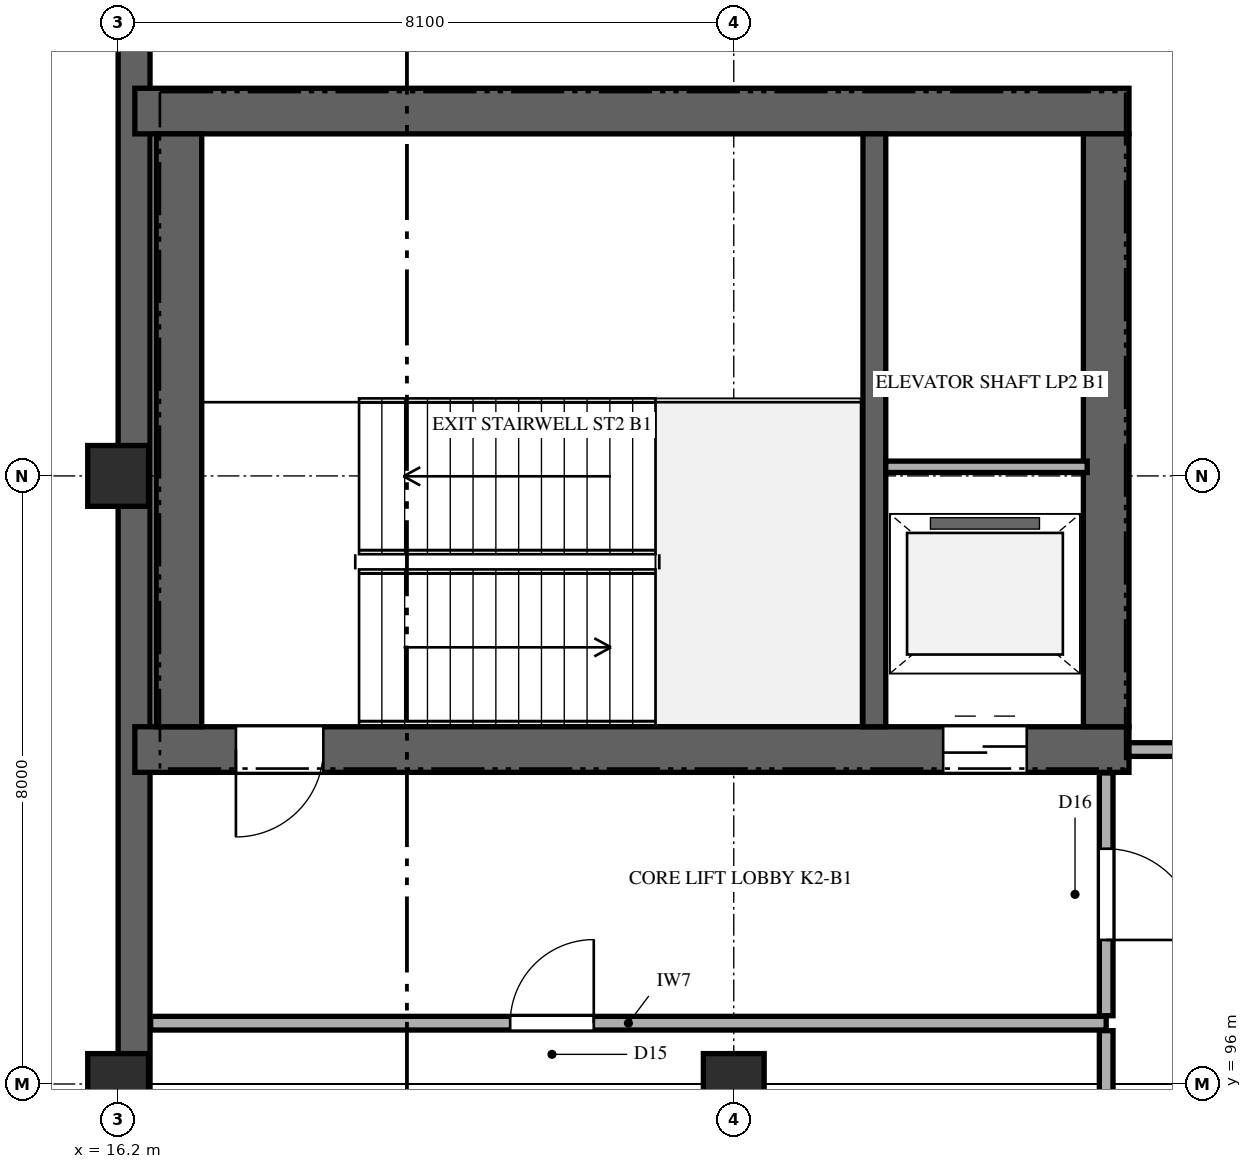
"""IFC4 building model, lengths in metres.
Left out: names, types, materials, properties, quantities, classifications, styles, units other than length and angle.
Written with IfcOpenShell. Run it as: python <this file> out.ifc"""

import sys

from ifc_helpers import new_model, si_unit, direction, frame, frame_2d, origin, origin_2d, place, context, subcontext, project, spatial, rectangle, extrude, element, fill, save


model = new_model("IFC4")
c1 = context("Model", 3, precision=1e-05, world=origin(), true_north=direction((0.0, 1.0)))
c2 = subcontext(c1, "Body", "Model", "MODEL_VIEW")
j1 = project(units=[si_unit("LENGTHUNIT", "METRE"), si_unit("PLANEANGLEUNIT", "RADIAN")], contexts=[c1])
p1 = place(None, origin())
s1 = spatial("IfcSite", under=j1, at=p1, CompositionType="ELEMENT")
p2 = place(p1, origin())
s2 = spatial("IfcBuilding", under=s1, at=p2, CompositionType="ELEMENT")
p3 = place(p2, frame((0.0, 0.0, -4.8)))
s3 = spatial("IfcBuildingStorey", under=s2, at=p3, CompositionType="ELEMENT", Elevation=-4.8)
p4 = place(p3, frame((16.41, 24.21, 0.0), z_axis=(0.0, 0.0, 1.0), x_axis=(0.0, 1.0, 0.0)))
e1 = element("IfcWall", 1, at=p4, inside=s3, PredefinedType="USERDEFINED", context=c2, shape_type="SweptSolid", body=[
    extrude(rectangle(XDim=87.58, YDim=0.42, at=frame_2d((43.79, 0.0))), origin(), (0.0, 0.0, 1.0), 4.45),
])
p5 = place(p3, frame((16.42, 100.4, 0.0), z_axis=(0.0, 0.0, 1.0), x_axis=(1.0, 0.0, 0.0)))
e2 = element("IfcWall", 2, at=p5, inside=s3, PredefinedType="SHEAR", context=c2, shape_type="SweptSolid", body=[
    extrude(rectangle(XDim=13.08, YDim=0.6, at=frame_2d((6.54, 0.0))), origin(), (0.0, 0.0, 1.0), 4.8),
])
p6 = place(p5, frame((1.33, 0.0, 0.0)))
e3 = element("IfcOpeningElement", 3, at=p6, cuts=e2, PredefinedType="OPENING", context=c2, shape_type="SweptSolid", body=[
    extrude(rectangle(XDim=1.15, YDim=2.25, at=frame_2d((0.575, 1.125))), frame((0.0, 0.31, 0.0), z_axis=(0.0, -1.0, 0.0), x_axis=(1.0, 0.0, 0.0)), (0.0, 0.0, 1.0), 0.62),
])
p7 = place(p5, frame((10.635, 0.0, 0.0)))
e4 = element("IfcOpeningElement", 4, at=p7, cuts=e2, PredefinedType="OPENING", context=c2, shape_type="SweptSolid", body=[
    extrude(rectangle(XDim=1.1, YDim=2.2, at=frame_2d((0.55, 1.1))), frame((0.0, 0.31, 0.0), z_axis=(0.0, -1.0, 0.0), x_axis=(1.0, 0.0, 0.0)), (0.0, 0.0, 1.0), 0.62),
])
p8 = place(p3, frame((16.42, 108.8, 0.0), z_axis=(0.0, 0.0, 1.0), x_axis=(1.0, 0.0, 0.0)))
e5 = element("IfcWall", 5, at=p8, inside=s3, PredefinedType="SHEAR", context=c2, shape_type="SweptSolid", body=[
    extrude(rectangle(XDim=13.08, YDim=0.6, at=frame_2d((6.54, 0.0))), origin(), (0.0, 0.0, 1.0), 4.8),
])
for number, where, z_axis, x_axis in (
    (6, (17.0, 100.7, 0.0), (0.0, 0.0, 1.0), (0.0, 1.0, 0.0)),
    (7, (29.2, 100.7, 0.0), (0.0, 0.0, 1.0), (0.0, 1.0, 0.0)),
):
    element("IfcWall", number, at=place(p3, frame(where, z_axis=z_axis, x_axis=x_axis)), inside=s3, PredefinedType="SHEAR", context=c2, shape_type="SweptSolid", body=[
        extrude(rectangle(XDim=7.8, YDim=0.6, at=frame_2d((3.9, 0.0))), origin(), (0.0, 0.0, 1.0), 4.8),
    ])
p9 = place(p3, frame((26.15, 100.7, 0.0), z_axis=(0.0, 0.0, 1.0), x_axis=(0.0, 1.0, 0.0)))
e8 = element("IfcWall", 8, at=p9, inside=s3, PredefinedType="SHEAR", context=c2, shape_type="SweptSolid", body=[
    extrude(rectangle(XDim=7.8, YDim=0.3, at=frame_2d((3.9, 0.0))), origin(), (0.0, 0.0, 1.0), 4.8),
])
for number, where, z_axis, x_axis in (
    (9, (16.2, 96.0, 0.0), (0.0, 0.0, 1.0), (1.0, 0.0, 0.0)),
    (10, (16.2, 104.0, 0.0), (0.0, 0.0, 1.0), (1.0, 0.0, 0.0)),
    (11, (24.3, 96.0, 0.0), (0.0, 0.0, 1.0), (1.0, 0.0, 0.0)),
):
    element("IfcColumn", number, at=place(p3, frame(where, z_axis=z_axis, x_axis=x_axis)), inside=s3, PredefinedType="COLUMN", context=c2, shape_type="SweptSolid", body=[
        extrude(rectangle(XDim=0.8, YDim=0.8, at=origin_2d()), origin(), (0.0, 0.0, 1.0), 4.8),
    ])
p10 = place(p3, frame((26.3, 104.12, 0.0), z_axis=(0.0, 0.0, 1.0), x_axis=(1.0, 0.0, 0.0)))
e12 = element("IfcWall", 12, at=p10, inside=s3, PredefinedType="PARTITIONING", context=c2, shape_type="SweptSolid", body=[
    extrude(rectangle(XDim=2.65, YDim=0.15, at=frame_2d((1.325, 0.0))), origin(), (0.0, 0.0, 1.0), 4.45),
])
p11 = place(p3, frame((16.628, 96.8, 0.0), z_axis=(0.0, 0.0, 1.0), x_axis=(1.0, 0.0, 0.0)))
e13 = element("IfcWall", 13, at=p11, inside=s3, PredefinedType="PARTITIONING", context=c2, shape_type="SweptSolid", body=[
    extrude(rectangle(XDim=12.572, YDim=0.18, at=frame_2d((6.286, 0.0))), origin(), (0.0, 0.0, 1.0), 4.45),
])
p12 = place(p11, frame((4.73, 0.0, 0.0)))
e14 = element("IfcOpeningElement", 14, at=p12, cuts=e13, PredefinedType="OPENING", context=c2, shape_type="SweptSolid", body=[
    extrude(rectangle(XDim=1.1, YDim=2.2, at=frame_2d((0.55, 1.1))), frame((0.0, 0.1, 0.0), z_axis=(0.0, -1.0, 0.0), x_axis=(1.0, 0.0, 0.0)), (0.0, 0.0, 1.0), 0.2),
])
p13 = place(p3, frame((29.5, 100.4, 0.0), z_axis=(0.0, 0.0, 1.0), x_axis=(1.0, 0.0, 0.0)))
e15 = element("IfcWall", 15, at=p13, inside=s3, PredefinedType="PARTITIONING", context=c2, shape_type="SweptSolid", body=[
    extrude(rectangle(XDim=5.733, YDim=0.18, at=frame_2d((2.867, 0.0))), origin(), (0.0, 0.0, 1.0), 4.45),
])
p14 = place(p3, frame((29.2, 93.298, 0.0), z_axis=(0.0, 0.0, 1.0), x_axis=(0.0, 1.0, 0.0)))
e16 = element("IfcWall", 16, at=p14, inside=s3, PredefinedType="PARTITIONING", context=c2, shape_type="SweptSolid", body=[
    extrude(rectangle(XDim=3.404, YDim=0.18, at=frame_2d((1.702, 0.0))), origin(), (0.0, 0.0, 1.0), 4.45),
])
p15 = place(p3, frame((29.2, 96.898, 0.0), z_axis=(0.0, 0.0, 1.0), x_axis=(0.0, 1.0, 0.0)))
e17 = element("IfcWall", 17, at=p15, inside=s3, PredefinedType="PARTITIONING", context=c2, shape_type="SweptSolid", body=[
    extrude(rectangle(XDim=3.194, YDim=0.18, at=frame_2d((1.597, 0.0))), origin(), (0.0, 0.0, 1.0), 4.45),
])
p16 = place(p15, frame((0.997, 0.0, 0.0)))
e18 = element("IfcOpeningElement", 18, at=p16, cuts=e17, PredefinedType="OPENING", context=c2, shape_type="SweptSolid", body=[
    extrude(rectangle(XDim=1.2, YDim=2.2, at=frame_2d((0.6, 1.1))), frame((0.0, 0.1, 0.0), z_axis=(0.0, -1.0, 0.0), x_axis=(1.0, 0.0, 0.0)), (0.0, 0.0, 1.0), 0.2),
])
p17 = place(p6, frame((1.15, 0.0, 0.0), z_axis=(0.0, 0.0, 1.0), x_axis=(-1.0, 0.0, 0.0)))
e19 = element("IfcDoor", 19, at=p17, inside=s3, OperationType="SINGLE_SWING_LEFT", PredefinedType="DOOR", context=c2, shape_type="SweptSolid", body=[
    extrude(rectangle(XDim=1.15, YDim=2.25, at=frame_2d((0.575, 1.125))), frame((0.0, 0.025, 0.0), z_axis=(0.0, -1.0, 0.0), x_axis=(1.0, 0.0, 0.0)), (0.0, 0.0, 1.0), 0.05),
])
fill(e3, e19)
p18 = place(p7, frame((1.1, 0.0, 0.0), z_axis=(0.0, 0.0, 1.0), x_axis=(-1.0, 0.0, 0.0)))
e20 = element("IfcDoor", 20, at=p18, inside=s3, OperationType="DOUBLE_DOOR_SLIDING", PredefinedType="DOOR", context=c2, shape_type="SweptSolid", body=[
    extrude(rectangle(XDim=1.1, YDim=2.2, at=frame_2d((0.55, 1.1))), frame((0.0, 0.025, 0.0), z_axis=(0.0, -1.0, 0.0), x_axis=(1.0, 0.0, 0.0)), (0.0, 0.0, 1.0), 0.05),
])
fill(e4, e20)
p19 = place(p12, origin())
e21 = element("IfcDoor", 21, at=p19, inside=s3, OperationType="SINGLE_SWING_RIGHT", PredefinedType="DOOR", context=c2, shape_type="SweptSolid", body=[
    extrude(rectangle(XDim=1.1, YDim=2.2, at=frame_2d((0.55, 1.1))), frame((0.0, 0.025, 0.0), z_axis=(0.0, -1.0, 0.0), x_axis=(1.0, 0.0, 0.0)), (0.0, 0.0, 1.0), 0.05),
])
fill(e14, e21)
p20 = place(p16, frame((1.2, 0.0, 0.0), z_axis=(0.0, 0.0, 1.0), x_axis=(-1.0, 0.0, 0.0)))
e22 = element("IfcDoor", 22, at=p20, inside=s3, OperationType="SINGLE_SWING_LEFT", PredefinedType="DOOR", context=c2, shape_type="SweptSolid", body=[
    extrude(rectangle(XDim=1.2, YDim=2.2, at=frame_2d((0.6, 1.1))), frame((0.0, 0.025, 0.0), z_axis=(0.0, -1.0, 0.0), x_axis=(1.0, 0.0, 0.0)), (0.0, 0.0, 1.0), 0.05),
])
fill(e18, e22)
save(model, sys.argv[1])
